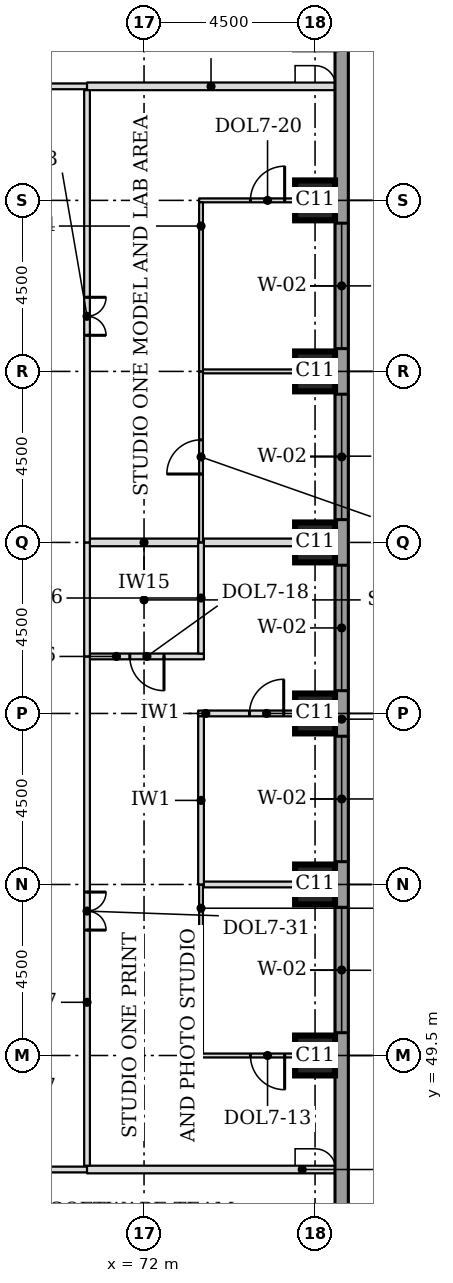
"""IFC4 building model, lengths in metres.
Left out: names, types, materials, properties, quantities, classifications, styles, units other than length and angle.
Written with IfcOpenShell. Run it as: python <this file> out.ifc"""

import sys

from ifc_helpers import new_model, si_unit, direction, frame, frame_2d, origin, origin_2d, place, context, subcontext, project, spatial, rectangle, extrude, element, fill, save


model = new_model("IFC4")
c1 = context("Model", 3, precision=1e-05, world=origin(), true_north=direction((0.0, 1.0)))
c2 = subcontext(c1, "Body", "Model", "MODEL_VIEW")
j1 = project(units=[si_unit("LENGTHUNIT", "METRE"), si_unit("PLANEANGLEUNIT", "RADIAN")], contexts=[c1])
p1 = place(None, origin())
s1 = spatial("IfcSite", under=j1, at=p1, CompositionType="ELEMENT")
p2 = place(p1, origin())
s2 = spatial("IfcBuilding", under=s1, at=p2, CompositionType="ELEMENT")
p3 = place(p2, frame((0.0, 0.0, 130.7)))
s3 = spatial("IfcBuildingStorey", under=s2, at=p3, CompositionType="ELEMENT", Elevation=130.7)
for number, where, z_axis, x_axis in (
    (1, (76.5, 49.5, 0.0), (0.0, 0.0, 1.0), (1.0, 0.0, 0.0)),
    (2, (76.5, 54.0, 0.0), (0.0, 0.0, 1.0), (1.0, 0.0, 0.0)),
    (3, (76.5, 58.5, 0.0), (0.0, 0.0, 1.0), (1.0, 0.0, 0.0)),
    (4, (76.5, 63.0, 0.0), (0.0, 0.0, 1.0), (1.0, 0.0, 0.0)),
    (5, (76.5, 67.5, 0.0), (0.0, 0.0, 1.0), (1.0, 0.0, 0.0)),
    (6, (76.5, 72.0, 0.0), (0.0, 0.0, 1.0), (1.0, 0.0, 0.0)),
):
    element("IfcColumn", number, at=place(p3, frame(where, z_axis=z_axis, x_axis=x_axis)), inside=s3, PredefinedType="COLUMN", context=c2, shape_type="SweptSolid", body=[
        extrude(rectangle(XDim=1.05, YDim=1.05, at=origin_2d()), origin(), (0.0, 0.0, 1.0), 3.7),
    ])
p4 = place(p3, frame((77.2, 44.638, 0.0), z_axis=(0.0, 0.0, 1.0), x_axis=(0.0, 1.0, 0.0)))
e7 = element("IfcWall", 7, at=p4, inside=s3, PredefinedType="STANDARD", context=c2, shape_type="SweptSolid", body=[
    extrude(rectangle(XDim=32.225, YDim=0.35, at=frame_2d((16.112, 0.0))), origin(), (0.0, 0.0, 1.0), 3.525),
])
p5 = place(p4, frame((5.462, 0.0, 0.9)))
e8 = element("IfcOpeningElement", 8, at=p5, cuts=e7, PredefinedType="OPENING", context=c2, shape_type="SweptSolid", body=[
    extrude(rectangle(XDim=3.3, YDim=1.9, at=frame_2d((1.65, 0.95))), frame((0.0, 0.185, 0.0), z_axis=(0.0, -1.0, 0.0), x_axis=(1.0, 0.0, 0.0)), (0.0, 0.0, 1.0), 0.37),
])
p6 = place(p4, frame((9.962, 0.0, 0.9)))
e9 = element("IfcOpeningElement", 9, at=p6, cuts=e7, PredefinedType="OPENING", context=c2, shape_type="SweptSolid", body=[
    extrude(rectangle(XDim=3.3, YDim=1.9, at=frame_2d((1.65, 0.95))), frame((0.0, 0.185, 0.0), z_axis=(0.0, -1.0, 0.0), x_axis=(1.0, 0.0, 0.0)), (0.0, 0.0, 1.0), 0.37),
])
p7 = place(p4, frame((14.462, 0.0, 0.9)))
e10 = element("IfcOpeningElement", 10, at=p7, cuts=e7, PredefinedType="OPENING", context=c2, shape_type="SweptSolid", body=[
    extrude(rectangle(XDim=3.3, YDim=1.9, at=frame_2d((1.65, 0.95))), frame((0.0, 0.185, 0.0), z_axis=(0.0, -1.0, 0.0), x_axis=(1.0, 0.0, 0.0)), (0.0, 0.0, 1.0), 0.37),
])
p8 = place(p4, frame((18.962, 0.0, 0.9)))
e11 = element("IfcOpeningElement", 11, at=p8, cuts=e7, PredefinedType="OPENING", context=c2, shape_type="SweptSolid", body=[
    extrude(rectangle(XDim=3.3, YDim=1.9, at=frame_2d((1.65, 0.95))), frame((0.0, 0.185, 0.0), z_axis=(0.0, -1.0, 0.0), x_axis=(1.0, 0.0, 0.0)), (0.0, 0.0, 1.0), 0.37),
])
p9 = place(p4, frame((23.462, 0.0, 0.9)))
e12 = element("IfcOpeningElement", 12, at=p9, cuts=e7, PredefinedType="OPENING", context=c2, shape_type="SweptSolid", body=[
    extrude(rectangle(XDim=3.3, YDim=1.9, at=frame_2d((1.65, 0.95))), frame((0.0, 0.185, 0.0), z_axis=(0.0, -1.0, 0.0), x_axis=(1.0, 0.0, 0.0)), (0.0, 0.0, 1.0), 0.37),
])
p10 = place(p3, frame((63.0, 46.5, 0.0), z_axis=(0.0, 0.0, 1.0), x_axis=(1.0, 0.0, 0.0)))
e13 = element("IfcWall", 13, at=p10, inside=s3, PredefinedType="PARTITIONING", context=c2, shape_type="SweptSolid", body=[
    extrude(rectangle(XDim=7.5, YDim=0.15, at=frame_2d((3.75, 0.0))), origin(), (0.0, 0.0, 1.0), 3.55),
])
p11 = place(p10, frame((3.25, 0.0, 0.0)))
e14 = element("IfcOpeningElement", 14, at=p11, cuts=e13, PredefinedType="OPENING", context=c2, shape_type="SweptSolid", body=[
    extrude(rectangle(XDim=1.0, YDim=2.1, at=frame_2d((0.5, 1.05))), frame((0.0, 0.085, 0.0), z_axis=(0.0, -1.0, 0.0), x_axis=(1.0, 0.0, 0.0)), (0.0, 0.0, 1.0), 0.17),
])
p12 = place(p3, frame((70.5, 46.5, 0.0), z_axis=(0.0, 0.0, 1.0), x_axis=(1.0, 0.0, 0.0)))
e15 = element("IfcWall", 15, at=p12, inside=s3, PredefinedType="PARTITIONING", context=c2, shape_type="SweptSolid", body=[
    extrude(rectangle(XDim=6.525, YDim=0.2, at=frame_2d((3.262, 0.0))), origin(), (0.0, 0.0, 1.0), 3.55),
])
p13 = place(p3, frame((73.45, 49.5, 0.0), z_axis=(0.0, 0.0, 1.0), x_axis=(1.0, 0.0, 0.0)))
e16 = element("IfcWall", 16, at=p13, inside=s3, PredefinedType="PARTITIONING", context=c2, shape_type="SweptSolid", body=[
    extrude(rectangle(XDim=3.575, YDim=0.1, at=frame_2d((1.788, 0.0))), origin(), (0.0, 0.0, 1.0), 3.55),
])
p14 = place(p13, frame((1.35, 0.0, 0.0)))
e17 = element("IfcOpeningElement", 17, at=p14, cuts=e16, PredefinedType="OPENING", context=c2, shape_type="SweptSolid", body=[
    extrude(rectangle(XDim=0.9, YDim=2.1, at=frame_2d((0.45, 1.05))), frame((0.0, 0.06, 0.0), z_axis=(0.0, -1.0, 0.0), x_axis=(1.0, 0.0, 0.0)), (0.0, 0.0, 1.0), 0.12),
])
p15 = place(p3, frame((73.575, 54.0, 0.0), z_axis=(0.0, 0.0, 1.0), x_axis=(1.0, 0.0, 0.0)))
e18 = element("IfcWall", 18, at=p15, inside=s3, PredefinedType="PARTITIONING", context=c2, shape_type="SweptSolid", body=[
    extrude(rectangle(XDim=3.45, YDim=0.15, at=frame_2d((1.725, 0.0))), origin(), (0.0, 0.0, 1.0), 3.55),
])
p16 = place(p3, frame((73.425, 58.5, 0.0), z_axis=(0.0, 0.0, 1.0), x_axis=(1.0, 0.0, 0.0)))
e19 = element("IfcWall", 19, at=p16, inside=s3, PredefinedType="PARTITIONING", context=c2, shape_type="SweptSolid", body=[
    extrude(rectangle(XDim=3.6, YDim=0.15, at=frame_2d((1.8, 0.0))), origin(), (0.0, 0.0, 1.0), 3.55),
])
p17 = place(p16, frame((1.35, 0.0, 0.0)))
e20 = element("IfcOpeningElement", 20, at=p17, cuts=e19, PredefinedType="OPENING", context=c2, shape_type="SweptSolid", body=[
    extrude(rectangle(XDim=0.9, YDim=2.1, at=frame_2d((0.45, 1.05))), frame((0.0, 0.085, 0.0), z_axis=(0.0, -1.0, 0.0), x_axis=(1.0, 0.0, 0.0)), (0.0, 0.0, 1.0), 0.17),
])
p18 = place(p3, frame((70.575, 60.0, 0.0), z_axis=(0.0, 0.0, 1.0), x_axis=(1.0, 0.0, 0.0)))
e21 = element("IfcWall", 21, at=p18, inside=s3, PredefinedType="PARTITIONING", context=c2, shape_type="SweptSolid", body=[
    extrude(rectangle(XDim=3.0, YDim=0.15, at=frame_2d((1.5, 0.0))), origin(), (0.0, 0.0, 1.0), 3.55),
])
p19 = place(p18, frame((1.05, 0.0, 0.0)))
e22 = element("IfcOpeningElement", 22, at=p19, cuts=e21, PredefinedType="OPENING", context=c2, shape_type="SweptSolid", body=[
    extrude(rectangle(XDim=0.9, YDim=2.1, at=frame_2d((0.45, 1.05))), frame((0.0, 0.085, 0.0), z_axis=(0.0, -1.0, 0.0), x_axis=(1.0, 0.0, 0.0)), (0.0, 0.0, 1.0), 0.17),
])
p20 = place(p3, frame((70.575, 63.0, 0.0), z_axis=(0.0, 0.0, 1.0), x_axis=(1.0, 0.0, 0.0)))
e23 = element("IfcWall", 23, at=p20, inside=s3, PredefinedType="PARTITIONING", context=c2, shape_type="SweptSolid", body=[
    extrude(rectangle(XDim=2.85, YDim=0.2, at=frame_2d((1.425, 0.0))), origin(), (0.0, 0.0, 1.0), 3.55),
])
p21 = place(p3, frame((73.575, 63.0, 0.0), z_axis=(0.0, 0.0, 1.0), x_axis=(1.0, 0.0, 0.0)))
e24 = element("IfcWall", 24, at=p21, inside=s3, PredefinedType="PARTITIONING", context=c2, shape_type="SweptSolid", body=[
    extrude(rectangle(XDim=3.45, YDim=0.2, at=frame_2d((1.725, 0.0))), origin(), (0.0, 0.0, 1.0), 3.55),
])
p22 = place(p3, frame((73.55, 67.5, 0.0), z_axis=(0.0, 0.0, 1.0), x_axis=(1.0, 0.0, 0.0)))
e25 = element("IfcWall", 25, at=p22, inside=s3, PredefinedType="PARTITIONING", context=c2, shape_type="SweptSolid", body=[
    extrude(rectangle(XDim=3.475, YDim=0.1, at=frame_2d((1.737, 0.0))), origin(), (0.0, 0.0, 1.0), 3.55),
])
p23 = place(p3, frame((73.45, 72.0, 0.0), z_axis=(0.0, 0.0, 1.0), x_axis=(1.0, 0.0, 0.0)))
e26 = element("IfcWall", 26, at=p23, inside=s3, PredefinedType="PARTITIONING", context=c2, shape_type="SweptSolid", body=[
    extrude(rectangle(XDim=3.575, YDim=0.1, at=frame_2d((1.788, 0.0))), origin(), (0.0, 0.0, 1.0), 3.55),
])
p24 = place(p23, frame((1.35, 0.0, 0.0)))
e27 = element("IfcOpeningElement", 27, at=p24, cuts=e26, PredefinedType="OPENING", context=c2, shape_type="SweptSolid", body=[
    extrude(rectangle(XDim=0.9, YDim=2.1, at=frame_2d((0.45, 1.05))), frame((0.0, 0.06, 0.0), z_axis=(0.0, -1.0, 0.0), x_axis=(1.0, 0.0, 0.0)), (0.0, 0.0, 1.0), 0.12),
])
p25 = place(p3, frame((58.5, 75.0, 0.0), z_axis=(0.0, 0.0, 1.0), x_axis=(1.0, 0.0, 0.0)))
e28 = element("IfcWall", 28, at=p25, inside=s3, PredefinedType="PARTITIONING", context=c2, shape_type="SweptSolid", body=[
    extrude(rectangle(XDim=12.0, YDim=0.15, at=frame_2d((6.0, 0.0))), origin(), (0.0, 0.0, 1.0), 3.55),
])
p26 = place(p25, frame((5.5, 0.0, 0.0)))
e29 = element("IfcOpeningElement", 29, at=p26, cuts=e28, PredefinedType="OPENING", context=c2, shape_type="SweptSolid", body=[
    extrude(rectangle(XDim=1.0, YDim=2.1, at=frame_2d((0.5, 1.05))), frame((0.0, 0.085, 0.0), z_axis=(0.0, -1.0, 0.0), x_axis=(1.0, 0.0, 0.0)), (0.0, 0.0, 1.0), 0.17),
])
p27 = place(p3, frame((70.5, 75.0, 0.0), z_axis=(0.0, 0.0, 1.0), x_axis=(1.0, 0.0, 0.0)))
e30 = element("IfcWall", 30, at=p27, inside=s3, PredefinedType="PARTITIONING", context=c2, shape_type="SweptSolid", body=[
    extrude(rectangle(XDim=6.525, YDim=0.2, at=frame_2d((3.262, 0.0))), origin(), (0.0, 0.0, 1.0), 3.55),
])
p28 = place(p3, frame((70.5, 46.6, 0.0), z_axis=(0.0, 0.0, 1.0), x_axis=(0.0, 1.0, 0.0)))
e31 = element("IfcWall", 31, at=p28, inside=s3, PredefinedType="PARTITIONING", context=c2, shape_type="SweptSolid", body=[
    extrude(rectangle(XDim=13.4, YDim=0.15, at=frame_2d((6.7, 0.0))), origin(), (0.0, 0.0, 1.0), 3.55),
])
p29 = place(p28, frame((6.2, 0.0, 0.0)))
e32 = element("IfcOpeningElement", 32, at=p29, cuts=e31, PredefinedType="OPENING", context=c2, shape_type="SweptSolid", body=[
    extrude(rectangle(XDim=1.0, YDim=2.1, at=frame_2d((0.5, 1.05))), frame((0.0, 0.085, 0.0), z_axis=(0.0, -1.0, 0.0), x_axis=(1.0, 0.0, 0.0)), (0.0, 0.0, 1.0), 0.17),
])
p30 = place(p3, frame((73.5, 49.55, 0.0), z_axis=(0.0, 0.0, 1.0), x_axis=(0.0, 1.0, 0.0)))
e33 = element("IfcWall", 33, at=p30, inside=s3, PredefinedType="PARTITIONING", context=c2, shape_type="SweptSolid", body=[
    extrude(rectangle(XDim=4.45, YDim=0.1, at=frame_2d((2.225, 0.0))), origin(), (0.0, 0.0, 1.0), 3.55),
])
p31 = place(p3, frame((73.5, 54.0, 0.0), z_axis=(0.0, 0.0, 1.0), x_axis=(0.0, 1.0, 0.0)))
e34 = element("IfcWall", 34, at=p31, inside=s3, PredefinedType="PARTITIONING", context=c2, shape_type="SweptSolid", body=[
    extrude(rectangle(XDim=4.425, YDim=0.15, at=frame_2d((2.212, 0.0))), origin(), (0.0, 0.0, 1.0), 3.55),
])
p32 = place(p3, frame((70.5, 60.0, 0.0), z_axis=(0.0, 0.0, 1.0), x_axis=(0.0, 1.0, 0.0)))
e35 = element("IfcWall", 35, at=p32, inside=s3, PredefinedType="PARTITIONING", context=c2, shape_type="SweptSolid", body=[
    extrude(rectangle(XDim=3.0, YDim=0.15, at=frame_2d((1.5, 0.0))), origin(), (0.0, 0.0, 1.0), 3.55),
])
p33 = place(p3, frame((73.5, 60.075, 0.0), z_axis=(0.0, 0.0, 1.0), x_axis=(0.0, 1.0, 0.0)))
e36 = element("IfcWall", 36, at=p33, inside=s3, PredefinedType="PARTITIONING", context=c2, shape_type="SweptSolid", body=[
    extrude(rectangle(XDim=2.925, YDim=0.15, at=frame_2d((1.462, 0.0))), origin(), (0.0, 0.0, 1.0), 3.55),
])
p34 = place(p3, frame((70.5, 63.0, 0.0), z_axis=(0.0, 0.0, 1.0), x_axis=(0.0, 1.0, 0.0)))
e37 = element("IfcWall", 37, at=p34, inside=s3, PredefinedType="PARTITIONING", context=c2, shape_type="SweptSolid", body=[
    extrude(rectangle(XDim=11.9, YDim=0.15, at=frame_2d((5.95, 0.0))), origin(), (0.0, 0.0, 1.0), 3.55),
])
p35 = place(p34, frame((5.45, 0.0, 0.0)))
e38 = element("IfcOpeningElement", 38, at=p35, cuts=e37, PredefinedType="OPENING", context=c2, shape_type="SweptSolid", body=[
    extrude(rectangle(XDim=1.0, YDim=2.1, at=frame_2d((0.5, 1.05))), frame((0.0, 0.085, 0.0), z_axis=(0.0, -1.0, 0.0), x_axis=(1.0, 0.0, 0.0)), (0.0, 0.0, 1.0), 0.17),
])
p36 = place(p3, frame((73.5, 63.0, 0.0), z_axis=(0.0, 0.0, 1.0), x_axis=(0.0, 1.0, 0.0)))
e39 = element("IfcWall", 39, at=p36, inside=s3, PredefinedType="PARTITIONING", context=c2, shape_type="SweptSolid", body=[
    extrude(rectangle(XDim=4.5, YDim=0.1, at=frame_2d((2.25, 0.0))), origin(), (0.0, 0.0, 1.0), 3.55),
])
p37 = place(p36, frame((1.8, 0.0, 0.0)))
e40 = element("IfcOpeningElement", 40, at=p37, cuts=e39, PredefinedType="OPENING", context=c2, shape_type="SweptSolid", body=[
    extrude(rectangle(XDim=0.9, YDim=2.1, at=frame_2d((0.45, 1.05))), frame((0.0, 0.06, 0.0), z_axis=(0.0, -1.0, 0.0), x_axis=(1.0, 0.0, 0.0)), (0.0, 0.0, 1.0), 0.12),
])
p38 = place(p3, frame((73.5, 67.5, 0.0), z_axis=(0.0, 0.0, 1.0), x_axis=(0.0, 1.0, 0.0)))
e41 = element("IfcWall", 41, at=p38, inside=s3, PredefinedType="PARTITIONING", context=c2, shape_type="SweptSolid", body=[
    extrude(rectangle(XDim=4.45, YDim=0.1, at=frame_2d((2.225, 0.0))), origin(), (0.0, 0.0, 1.0), 3.55),
])
p39 = place(p5, origin())
e42 = element("IfcWindow", 42, at=p39, inside=s3, PartitioningType="SINGLE_PANEL", PredefinedType="WINDOW", context=c2, shape_type="SweptSolid", body=[
    extrude(rectangle(XDim=3.3, YDim=1.9, at=frame_2d((1.65, 0.95))), frame((0.0, 0.085, 0.0), z_axis=(0.0, -1.0, 0.0), x_axis=(1.0, 0.0, 0.0)), (0.0, 0.0, 1.0), 0.06),
])
fill(e8, e42)
p40 = place(p6, origin())
e43 = element("IfcWindow", 43, at=p40, inside=s3, PartitioningType="SINGLE_PANEL", PredefinedType="WINDOW", context=c2, shape_type="SweptSolid", body=[
    extrude(rectangle(XDim=3.3, YDim=1.9, at=frame_2d((1.65, 0.95))), frame((0.0, 0.085, 0.0), z_axis=(0.0, -1.0, 0.0), x_axis=(1.0, 0.0, 0.0)), (0.0, 0.0, 1.0), 0.06),
])
fill(e9, e43)
p41 = place(p7, origin())
e44 = element("IfcWindow", 44, at=p41, inside=s3, PartitioningType="SINGLE_PANEL", PredefinedType="WINDOW", context=c2, shape_type="SweptSolid", body=[
    extrude(rectangle(XDim=3.3, YDim=1.9, at=frame_2d((1.65, 0.95))), frame((0.0, 0.085, 0.0), z_axis=(0.0, -1.0, 0.0), x_axis=(1.0, 0.0, 0.0)), (0.0, 0.0, 1.0), 0.06),
])
fill(e10, e44)
p42 = place(p8, origin())
e45 = element("IfcWindow", 45, at=p42, inside=s3, PartitioningType="SINGLE_PANEL", PredefinedType="WINDOW", context=c2, shape_type="SweptSolid", body=[
    extrude(rectangle(XDim=3.3, YDim=1.9, at=frame_2d((1.65, 0.95))), frame((0.0, 0.085, 0.0), z_axis=(0.0, -1.0, 0.0), x_axis=(1.0, 0.0, 0.0)), (0.0, 0.0, 1.0), 0.06),
])
fill(e11, e45)
p43 = place(p9, origin())
e46 = element("IfcWindow", 46, at=p43, inside=s3, PartitioningType="SINGLE_PANEL", PredefinedType="WINDOW", context=c2, shape_type="SweptSolid", body=[
    extrude(rectangle(XDim=3.3, YDim=1.9, at=frame_2d((1.65, 0.95))), frame((0.0, 0.085, 0.0), z_axis=(0.0, -1.0, 0.0), x_axis=(1.0, 0.0, 0.0)), (0.0, 0.0, 1.0), 0.06),
])
fill(e12, e46)
p44 = place(p29, frame((1.0, 0.0, 0.0), z_axis=(0.0, 0.0, 1.0), x_axis=(-1.0, 0.0, 0.0)))
e47 = element("IfcDoor", 47, at=p44, inside=s3, OperationType="DOUBLE_DOOR_SINGLE_SWING", PredefinedType="DOOR", context=c2, shape_type="SweptSolid", body=[
    extrude(rectangle(XDim=1.0, YDim=2.1, at=frame_2d((0.5, 1.05))), frame((0.0, 0.025, 0.0), z_axis=(0.0, -1.0, 0.0), x_axis=(1.0, 0.0, 0.0)), (0.0, 0.0, 1.0), 0.05),
])
fill(e32, e47)
p45 = place(p14, frame((0.9, 0.0, 0.0), z_axis=(0.0, 0.0, 1.0), x_axis=(-1.0, 0.0, 0.0)))
e48 = element("IfcDoor", 48, at=p45, inside=s3, OperationType="SINGLE_SWING_LEFT", PredefinedType="DOOR", context=c2, shape_type="SweptSolid", body=[
    extrude(rectangle(XDim=0.9, YDim=2.1, at=frame_2d((0.45, 1.05))), frame((0.0, 0.025, 0.0), z_axis=(0.0, -1.0, 0.0), x_axis=(1.0, 0.0, 0.0)), (0.0, 0.0, 1.0), 0.05),
])
fill(e17, e48)
p46 = place(p19, frame((0.9, 0.0, 0.0), z_axis=(0.0, 0.0, 1.0), x_axis=(-1.0, 0.0, 0.0)))
e49 = element("IfcDoor", 49, at=p46, inside=s3, OperationType="SINGLE_SWING_LEFT", PredefinedType="DOOR", context=c2, shape_type="SweptSolid", body=[
    extrude(rectangle(XDim=0.9, YDim=2.1, at=frame_2d((0.45, 1.05))), frame((0.0, 0.025, 0.0), z_axis=(0.0, -1.0, 0.0), x_axis=(1.0, 0.0, 0.0)), (0.0, 0.0, 1.0), 0.05),
])
fill(e22, e49)
p47 = place(p17, origin())
e50 = element("IfcDoor", 50, at=p47, inside=s3, OperationType="SINGLE_SWING_RIGHT", PredefinedType="DOOR", context=c2, shape_type="SweptSolid", body=[
    extrude(rectangle(XDim=0.9, YDim=2.1, at=frame_2d((0.45, 1.05))), frame((0.0, 0.025, 0.0), z_axis=(0.0, -1.0, 0.0), x_axis=(1.0, 0.0, 0.0)), (0.0, 0.0, 1.0), 0.05),
])
fill(e20, e50)
p48 = place(p35, frame((1.0, 0.0, 0.0), z_axis=(0.0, 0.0, 1.0), x_axis=(-1.0, 0.0, 0.0)))
e51 = element("IfcDoor", 51, at=p48, inside=s3, OperationType="DOUBLE_DOOR_SINGLE_SWING", PredefinedType="DOOR", context=c2, shape_type="SweptSolid", body=[
    extrude(rectangle(XDim=1.0, YDim=2.1, at=frame_2d((0.5, 1.05))), frame((0.0, 0.025, 0.0), z_axis=(0.0, -1.0, 0.0), x_axis=(1.0, 0.0, 0.0)), (0.0, 0.0, 1.0), 0.05),
])
fill(e38, e51)
p49 = place(p37, origin())
e52 = element("IfcDoor", 52, at=p49, inside=s3, OperationType="SINGLE_SWING_LEFT", PredefinedType="DOOR", context=c2, shape_type="SweptSolid", body=[
    extrude(rectangle(XDim=0.9, YDim=2.1, at=frame_2d((0.45, 1.05))), frame((0.0, 0.025, 0.0), z_axis=(0.0, -1.0, 0.0), x_axis=(1.0, 0.0, 0.0)), (0.0, 0.0, 1.0), 0.05),
])
fill(e40, e52)
p50 = place(p24, origin())
e53 = element("IfcDoor", 53, at=p50, inside=s3, OperationType="SINGLE_SWING_RIGHT", PredefinedType="DOOR", context=c2, shape_type="SweptSolid", body=[
    extrude(rectangle(XDim=0.9, YDim=2.1, at=frame_2d((0.45, 1.05))), frame((0.0, 0.025, 0.0), z_axis=(0.0, -1.0, 0.0), x_axis=(1.0, 0.0, 0.0)), (0.0, 0.0, 1.0), 0.05),
])
fill(e27, e53)
save(model, sys.argv[1])
